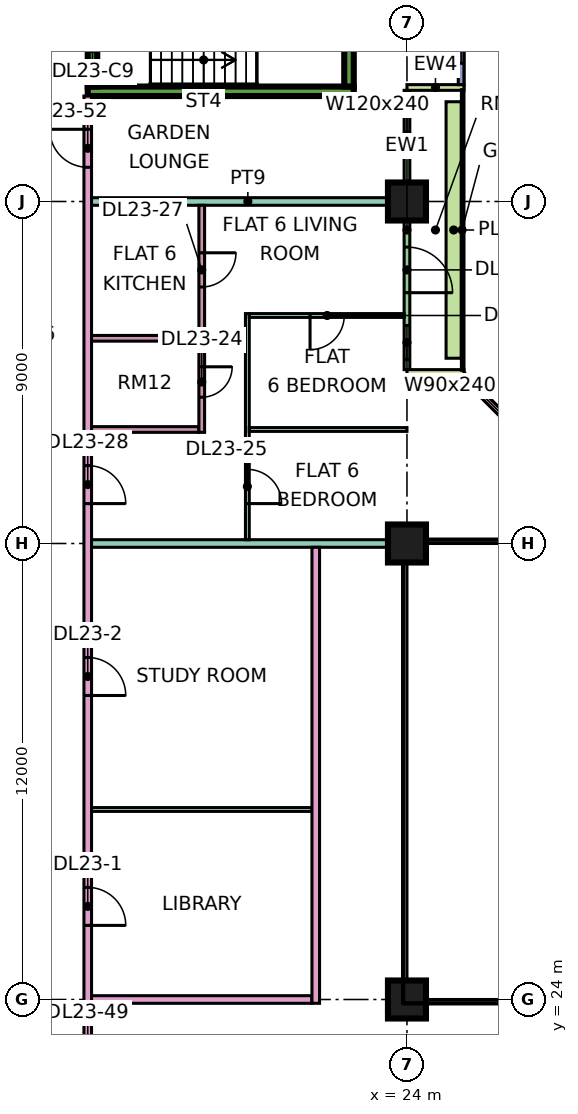
"""IFC4 building model, lengths in metres.
Left out: names, types, materials, properties, quantities, classifications, styles, units other than length and angle.
Written with IfcOpenShell. Run it as: python <this file> out.ifc"""

import sys

from ifc_helpers import new_model, si_unit, direction, frame, frame_2d, origin, origin_2d, place, context, subcontext, project, spatial, rectangle, extrude, element, fill, save


model = new_model("IFC4")
c1 = context("Model", 3, precision=1e-05, world=origin(), true_north=direction((0.0, 1.0)))
c2 = subcontext(c1, "Body", "Model", "MODEL_VIEW")
j1 = project(units=[si_unit("LENGTHUNIT", "METRE"), si_unit("PLANEANGLEUNIT", "RADIAN")], contexts=[c1])
p1 = place(None, origin())
s1 = spatial("IfcSite", under=j1, at=p1, CompositionType="ELEMENT")
p2 = place(p1, origin())
s2 = spatial("IfcBuilding", under=s1, at=p2, CompositionType="ELEMENT")
p3 = place(p2, frame((0.0, 0.0, 103.15)))
s3 = spatial("IfcBuildingStorey", under=s2, at=p3, CompositionType="ELEMENT", Elevation=103.15)
for number, where, z_axis, x_axis in (
    (1, (24.0, 24.0, 0.0), (0.0, 0.0, 1.0), (1.0, 0.0, 0.0)),
    (2, (24.0, 36.0, 0.0), (0.0, 0.0, 1.0), (1.0, 0.0, 0.0)),
    (3, (24.0, 45.0, 0.0), (0.0, 0.0, 1.0), (1.0, 0.0, 0.0)),
):
    element("IfcColumn", number, at=place(p3, frame(where, z_axis=z_axis, x_axis=x_axis)), inside=s3, PredefinedType="COLUMN", context=c2, shape_type="SweptSolid", body=[
        extrude(rectangle(XDim=1.0, YDim=1.0, at=origin_2d()), origin(), (0.0, 0.0, 1.0), 3.75),
    ])
p4 = place(p3, frame((15.6, 47.9, 0.0), z_axis=(0.0, 0.0, 1.0), x_axis=(1.0, 0.0, 0.0)))
e4 = element("IfcWall", 4, at=p4, inside=s3, PredefinedType="SHEAR", context=c2, shape_type="SweptSolid", body=[
    extrude(rectangle(XDim=7.0, YDim=0.25, at=frame_2d((3.5, 0.0))), origin(), (0.0, 0.0, 1.0), 3.75),
])
p5 = place(p3, frame((15.725, 48.025, 0.0), z_axis=(0.0, 0.0, 1.0), x_axis=(0.0, 1.0, 0.0)))
e5 = element("IfcWall", 5, at=p5, inside=s3, PredefinedType="SHEAR", context=c2, shape_type="SweptSolid", body=[
    extrude(rectangle(XDim=2.95, YDim=0.25, at=frame_2d((1.475, 0.0))), origin(), (0.0, 0.0, 1.0), 3.75),
])
p6 = place(p5, frame((0.925, 0.0, 0.0)))
e6 = element("IfcOpeningElement", 6, at=p6, cuts=e5, PredefinedType="OPENING", context=c2, shape_type="SweptSolid", body=[
    extrude(rectangle(XDim=1.1, YDim=2.2, at=frame_2d((0.55, 1.1))), frame((0.0, 0.135, 0.0), z_axis=(0.0, -1.0, 0.0), x_axis=(1.0, 0.0, 0.0)), (0.0, 0.0, 1.0), 0.27),
])
p7 = place(p3, frame((22.475, 48.025, 0.0), z_axis=(0.0, 0.0, 1.0), x_axis=(0.0, 1.0, 0.0)))
e7 = element("IfcWall", 7, at=p7, inside=s3, PredefinedType="SHEAR", context=c2, shape_type="SweptSolid", body=[
    extrude(rectangle(XDim=2.95, YDim=0.25, at=frame_2d((1.475, 0.0))), origin(), (0.0, 0.0, 1.0), 3.75),
])
p8 = place(p3, frame((28.447, 37.447, 0.0), z_axis=(0.0, 0.0, 1.0), x_axis=(-0.707106781187, 0.707106781187, 0.0)))
e8 = element("IfcWall", 8, at=p8, inside=s3, PredefinedType="SOLIDWALL", context=c2, shape_type="SweptSolid", body=[
    extrude(rectangle(XDim=4.243, YDim=0.15, at=frame_2d((2.121, 0.0))), origin(), (0.0, 0.0, 1.0), 3.35),
])
p9 = place(p8, frame((0.621, 0.0, 0.45)))
e9 = element("IfcOpeningElement", 9, at=p9, cuts=e8, PredefinedType="OPENING", context=c2, shape_type="SweptSolid", body=[
    extrude(rectangle(XDim=3.0, YDim=2.4, at=frame_2d((1.5, 1.2))), frame((0.0, 0.085, 0.0), z_axis=(0.0, -1.0, 0.0), x_axis=(1.0, 0.0, 0.0)), (0.0, 0.0, 1.0), 0.17),
])
p10 = place(p3, frame((24.0, 40.575, 0.0), z_axis=(0.0, 0.0, 1.0), x_axis=(0.0, 1.0, 0.0)))
e10 = element("IfcWall", 10, at=p10, inside=s3, PredefinedType="SOLIDWALL", context=c2, shape_type="SweptSolid", body=[
    extrude(rectangle(XDim=7.35, YDim=0.15, at=frame_2d((3.675, 0.0))), origin(), (0.0, 0.0, 1.0), 3.35),
])
p11 = place(p10, frame((0.262, 0.0, 0.45)))
e11 = element("IfcOpeningElement", 11, at=p11, cuts=e10, PredefinedType="OPENING", context=c2, shape_type="SweptSolid", body=[
    extrude(rectangle(XDim=0.9, YDim=2.4, at=frame_2d((0.45, 1.2))), frame((0.0, 0.085, 0.0), z_axis=(0.0, -1.0, 0.0), x_axis=(1.0, 0.0, 0.0)), (0.0, 0.0, 1.0), 0.17),
])
p12 = place(p10, frame((2.025, 0.0, 0.0)))
e12 = element("IfcOpeningElement", 12, at=p12, cuts=e10, PredefinedType="OPENING", context=c2, shape_type="SweptSolid", body=[
    extrude(rectangle(XDim=1.2, YDim=2.4, at=frame_2d((0.6, 1.2))), frame((0.0, 0.085, 0.0), z_axis=(0.0, -1.0, 0.0), x_axis=(1.0, 0.0, 0.0)), (0.0, 0.0, 1.0), 0.17),
])
p13 = place(p10, frame((5.587, 0.0, 0.45)))
e13 = element("IfcOpeningElement", 13, at=p13, cuts=e10, PredefinedType="OPENING", context=c2, shape_type="SweptSolid", body=[
    extrude(rectangle(XDim=1.2, YDim=2.4, at=frame_2d((0.6, 1.2))), frame((0.0, 0.085, 0.0), z_axis=(0.0, -1.0, 0.0), x_axis=(1.0, 0.0, 0.0)), (0.0, 0.0, 1.0), 0.17),
])
for number, where, z_axis, x_axis in (
    (14, (25.5, 40.5, 0.0), (0.0, 0.0, 1.0), (-1.0, 0.0, 0.0)),
    (15, (25.5, 48.0, 0.0), (0.0, 0.0, 1.0), (-1.0, 0.0, 0.0)),
):
    element("IfcWall", number, at=place(p3, frame(where, z_axis=z_axis, x_axis=x_axis)), inside=s3, PredefinedType="SOLIDWALL", context=c2, shape_type="SweptSolid", body=[
        extrude(rectangle(XDim=1.5, YDim=0.15, at=frame_2d((0.75, 0.0))), origin(), (0.0, 0.0, 1.0), 3.35),
    ])
p14 = place(p3, frame((25.425, 48.075, 0.0), z_axis=(0.0, 0.0, 1.0), x_axis=(0.0, 1.0, 0.0)))
e16 = element("IfcWall", 16, at=p14, inside=s3, PredefinedType="SOLIDWALL", context=c2, shape_type="SweptSolid", body=[
    extrude(rectangle(XDim=13.425, YDim=0.15, at=frame_2d((6.712, 0.0))), origin(), (0.0, 0.0, 1.0), 3.35),
])
p15 = place(p14, frame((0.562, 0.0, 0.45)))
e17 = element("IfcOpeningElement", 17, at=p15, cuts=e16, PredefinedType="OPENING", context=c2, shape_type="SweptSolid", body=[
    extrude(rectangle(XDim=4.8, YDim=2.4, at=frame_2d((2.4, 1.2))), frame((0.0, 0.085, 0.0), z_axis=(0.0, -1.0, 0.0), x_axis=(1.0, 0.0, 0.0)), (0.0, 0.0, 1.0), 0.17),
])
p16 = place(p14, frame((6.525, 0.0, 0.45)))
e18 = element("IfcOpeningElement", 18, at=p16, cuts=e16, PredefinedType="OPENING", context=c2, shape_type="SweptSolid", body=[
    extrude(rectangle(XDim=1.8, YDim=2.4, at=frame_2d((0.9, 1.2))), frame((0.0, 0.085, 0.0), z_axis=(0.0, -1.0, 0.0), x_axis=(1.0, 0.0, 0.0)), (0.0, 0.0, 1.0), 0.17),
])
p17 = place(p14, frame((9.525, 0.0, 0.45)))
e19 = element("IfcOpeningElement", 19, at=p17, cuts=e16, PredefinedType="OPENING", context=c2, shape_type="SweptSolid", body=[
    extrude(rectangle(XDim=1.8, YDim=2.4, at=frame_2d((0.9, 1.2))), frame((0.0, 0.085, 0.0), z_axis=(0.0, -1.0, 0.0), x_axis=(1.0, 0.0, 0.0)), (0.0, 0.0, 1.0), 0.17),
])
p18 = place(p14, frame((12.225, 0.0, 0.45)))
e20 = element("IfcOpeningElement", 20, at=p18, cuts=e16, PredefinedType="OPENING", context=c2, shape_type="SweptSolid", body=[
    extrude(rectangle(XDim=0.9, YDim=2.4, at=frame_2d((0.45, 1.2))), frame((0.0, 0.085, 0.0), z_axis=(0.0, -1.0, 0.0), x_axis=(1.0, 0.0, 0.0)), (0.0, 0.0, 1.0), 0.17),
])
p19 = place(p3, frame((25.229, 40.875, 0.0), z_axis=(0.0, 0.0, 1.0), x_axis=(0.0, 1.0, 0.0)))
e21 = element("IfcWall", 21, at=p19, inside=s3, PredefinedType="SOLIDWALL", context=c2, shape_type="SweptSolid", body=[
    extrude(rectangle(XDim=6.75, YDim=0.4, at=frame_2d((3.375, 0.0))), origin(), (0.0, 0.0, 1.0), 0.7),
])
p20 = place(p3, frame((15.6, 20.0, 0.0), z_axis=(0.0, 0.0, 1.0), x_axis=(0.0, 1.0, 0.0)))
e22 = element("IfcWall", 22, at=p20, inside=s3, PredefinedType="PARTITIONING", context=c2, shape_type="SweptSolid", body=[
    extrude(rectangle(XDim=27.775, YDim=0.2, at=frame_2d((13.887, 0.0))), origin(), (0.0, 0.0, 1.0), 3.35),
])
p21 = place(p20, frame((5.95, 0.0, 0.0)))
e23 = element("IfcOpeningElement", 23, at=p21, cuts=e22, PredefinedType="OPENING", context=c2, shape_type="SweptSolid", body=[
    extrude(rectangle(XDim=1.0, YDim=2.1, at=frame_2d((0.5, 1.05))), frame((0.0, 0.11, 0.0), z_axis=(0.0, -1.0, 0.0), x_axis=(1.0, 0.0, 0.0)), (0.0, 0.0, 1.0), 0.22),
])
p22 = place(p20, frame((12.0, 0.0, 0.0)))
e24 = element("IfcOpeningElement", 24, at=p22, cuts=e22, PredefinedType="OPENING", context=c2, shape_type="SweptSolid", body=[
    extrude(rectangle(XDim=1.0, YDim=2.1, at=frame_2d((0.5, 1.05))), frame((0.0, 0.11, 0.0), z_axis=(0.0, -1.0, 0.0), x_axis=(1.0, 0.0, 0.0)), (0.0, 0.0, 1.0), 0.22),
])
p23 = place(p20, frame((17.05, 0.0, 0.0)))
e25 = element("IfcOpeningElement", 25, at=p23, cuts=e22, PredefinedType="OPENING", context=c2, shape_type="SweptSolid", body=[
    extrude(rectangle(XDim=1.0, YDim=2.1, at=frame_2d((0.5, 1.05))), frame((0.0, 0.11, 0.0), z_axis=(0.0, -1.0, 0.0), x_axis=(1.0, 0.0, 0.0)), (0.0, 0.0, 1.0), 0.22),
])
p24 = place(p20, frame((1.15, 0.0, 0.0)))
e26 = element("IfcOpeningElement", 26, at=p24, cuts=e22, PredefinedType="OPENING", context=c2, shape_type="SweptSolid", body=[
    extrude(rectangle(XDim=1.8, YDim=2.1, at=frame_2d((0.9, 1.05))), frame((0.0, 0.11, 0.0), z_axis=(0.0, -1.0, 0.0), x_axis=(1.0, 0.0, 0.0)), (0.0, 0.0, 1.0), 0.22),
])
p25 = place(p20, frame((25.9, 0.0, 0.0)))
e27 = element("IfcOpeningElement", 27, at=p25, cuts=e22, PredefinedType="OPENING", context=c2, shape_type="SweptSolid", body=[
    extrude(rectangle(XDim=1.0, YDim=2.1, at=frame_2d((0.5, 1.05))), frame((0.0, 0.11, 0.0), z_axis=(0.0, -1.0, 0.0), x_axis=(1.0, 0.0, 0.0)), (0.0, 0.0, 1.0), 0.22),
])
p26 = place(p3, frame((15.7, 24.0, 0.0), z_axis=(0.0, 0.0, 1.0), x_axis=(1.0, 0.0, 0.0)))
e28 = element("IfcWall", 28, at=p26, inside=s3, PredefinedType="PARTITIONING", context=c2, shape_type="SweptSolid", body=[
    extrude(rectangle(XDim=5.8, YDim=0.2, at=frame_2d((2.9, 0.0))), origin(), (0.0, 0.0, 1.0), 3.35),
])
p27 = place(p3, frame((15.7, 29.0, 0.0), z_axis=(0.0, 0.0, 1.0), x_axis=(1.0, 0.0, 0.0)))
e29 = element("IfcWall", 29, at=p27, inside=s3, PredefinedType="PARTITIONING", context=c2, shape_type="SweptSolid", body=[
    extrude(rectangle(XDim=5.8, YDim=0.1, at=frame_2d((2.9, 0.0))), origin(), (0.0, 0.0, 1.0), 3.35),
])
p28 = place(p3, frame((15.7, 36.0, 0.0), z_axis=(0.0, 0.0, 1.0), x_axis=(1.0, 0.0, 0.0)))
e30 = element("IfcWall", 30, at=p28, inside=s3, PredefinedType="PARTITIONING", context=c2, shape_type="SweptSolid", body=[
    extrude(rectangle(XDim=8.3, YDim=0.2, at=frame_2d((4.15, 0.0))), origin(), (0.0, 0.0, 1.0), 3.35),
])
for number, where, z_axis, x_axis in (
    (31, (15.7, 39.0, 0.0), (0.0, 0.0, 1.0), (1.0, 0.0, 0.0)),
    (32, (15.7, 41.4, 0.0), (0.0, 0.0, 1.0), (1.0, 0.0, 0.0)),
):
    element("IfcWall", number, at=place(p3, frame(where, z_axis=z_axis, x_axis=x_axis)), inside=s3, PredefinedType="PARTITIONING", context=c2, shape_type="SweptSolid", body=[
        extrude(rectangle(XDim=2.825, YDim=0.15, at=frame_2d((1.413, 0.0))), origin(), (0.0, 0.0, 1.0), 3.35),
    ])
p29 = place(p3, frame((15.7, 45.0, 0.0), z_axis=(0.0, 0.0, 1.0), x_axis=(1.0, 0.0, 0.0)))
e33 = element("IfcWall", 33, at=p29, inside=s3, PredefinedType="PARTITIONING", context=c2, shape_type="SweptSolid", body=[
    extrude(rectangle(XDim=8.226, YDim=0.2, at=frame_2d((4.113, 0.0))), origin(), (0.0, 0.0, 1.0), 3.35),
])
p30 = place(p3, frame((18.6, 38.925, 0.0), z_axis=(0.0, 0.0, 1.0), x_axis=(0.0, 1.0, 0.0)))
e34 = element("IfcWall", 34, at=p30, inside=s3, PredefinedType="PARTITIONING", context=c2, shape_type="SweptSolid", body=[
    extrude(rectangle(XDim=5.975, YDim=0.15, at=frame_2d((2.987, 0.0))), origin(), (0.0, 0.0, 1.0), 3.35),
])
p31 = place(p30, frame((0.925, 0.0, 0.0)))
e35 = element("IfcOpeningElement", 35, at=p31, cuts=e34, PredefinedType="OPENING", context=c2, shape_type="SweptSolid", body=[
    extrude(rectangle(XDim=0.8, YDim=2.1, at=frame_2d((0.4, 1.05))), frame((0.0, 0.085, 0.0), z_axis=(0.0, -1.0, 0.0), x_axis=(1.0, 0.0, 0.0)), (0.0, 0.0, 1.0), 0.17),
])
p32 = place(p30, frame((3.825, 0.0, 0.0)))
e36 = element("IfcOpeningElement", 36, at=p32, cuts=e34, PredefinedType="OPENING", context=c2, shape_type="SweptSolid", body=[
    extrude(rectangle(XDim=0.9, YDim=2.1, at=frame_2d((0.45, 1.05))), frame((0.0, 0.085, 0.0), z_axis=(0.0, -1.0, 0.0), x_axis=(1.0, 0.0, 0.0)), (0.0, 0.0, 1.0), 0.17),
])
p33 = place(p3, frame((19.8, 36.1, 0.0), z_axis=(0.0, 0.0, 1.0), x_axis=(0.0, 1.0, 0.0)))
e37 = element("IfcWall", 37, at=p33, inside=s3, PredefinedType="PARTITIONING", context=c2, shape_type="SweptSolid", body=[
    extrude(rectangle(XDim=5.95, YDim=0.1, at=frame_2d((2.975, 0.0))), origin(), (0.0, 0.0, 1.0), 3.35),
])
p34 = place(p33, frame((0.95, 0.0, 0.0)))
e38 = element("IfcOpeningElement", 38, at=p34, cuts=e37, PredefinedType="OPENING", context=c2, shape_type="SweptSolid", body=[
    extrude(rectangle(XDim=0.9, YDim=2.1, at=frame_2d((0.45, 1.05))), frame((0.0, 0.06, 0.0), z_axis=(0.0, -1.0, 0.0), x_axis=(1.0, 0.0, 0.0)), (0.0, 0.0, 1.0), 0.12),
])
p35 = place(p3, frame((19.85, 39.0, 0.0), z_axis=(0.0, 0.0, 1.0), x_axis=(1.0, 0.0, 0.0)))
e39 = element("IfcWall", 39, at=p35, inside=s3, PredefinedType="PARTITIONING", context=c2, shape_type="SweptSolid", body=[
    extrude(rectangle(XDim=4.15, YDim=0.1, at=frame_2d((2.075, 0.0))), origin(), (0.0, 0.0, 1.0), 3.35),
])
p36 = place(p3, frame((19.85, 42.0, 0.0), z_axis=(0.0, 0.0, 1.0), x_axis=(1.0, 0.0, 0.0)))
e40 = element("IfcWall", 40, at=p36, inside=s3, PredefinedType="PARTITIONING", context=c2, shape_type="SweptSolid", body=[
    extrude(rectangle(XDim=4.076, YDim=0.1, at=frame_2d((2.038, 0.0))), origin(), (0.0, 0.0, 1.0), 3.35),
])
p37 = place(p36, frame((1.6, 0.0, 0.0)))
e41 = element("IfcOpeningElement", 41, at=p37, cuts=e40, PredefinedType="OPENING", context=c2, shape_type="SweptSolid", body=[
    extrude(rectangle(XDim=0.9, YDim=2.1, at=frame_2d((0.45, 1.05))), frame((0.0, 0.06, 0.0), z_axis=(0.0, -1.0, 0.0), x_axis=(1.0, 0.0, 0.0)), (0.0, 0.0, 1.0), 0.12),
])
p38 = place(p3, frame((21.6, 23.9, 0.0), z_axis=(0.0, 0.0, 1.0), x_axis=(0.0, 1.0, 0.0)))
e42 = element("IfcWall", 42, at=p38, inside=s3, PredefinedType="PARTITIONING", context=c2, shape_type="SweptSolid", body=[
    extrude(rectangle(XDim=12.0, YDim=0.2, at=frame_2d((6.0, 0.0))), origin(), (0.0, 0.0, 1.0), 3.35),
])
p39 = place(p9, origin())
e43 = element("IfcWindow", 43, at=p39, inside=s3, PartitioningType="SINGLE_PANEL", PredefinedType="WINDOW", context=c2, shape_type="SweptSolid", body=[
    extrude(rectangle(XDim=3.0, YDim=2.4, at=frame_2d((1.5, 1.2))), frame((0.0, 0.03, 0.0), z_axis=(0.0, -1.0, 0.0), x_axis=(1.0, 0.0, 0.0)), (0.0, 0.0, 1.0), 0.06),
])
fill(e9, e43)
p40 = place(p11, origin())
e44 = element("IfcWindow", 44, at=p40, inside=s3, PartitioningType="SINGLE_PANEL", PredefinedType="WINDOW", context=c2, shape_type="SweptSolid", body=[
    extrude(rectangle(XDim=0.9, YDim=2.4, at=frame_2d((0.45, 1.2))), frame((0.0, 0.03, 0.0), z_axis=(0.0, -1.0, 0.0), x_axis=(1.0, 0.0, 0.0)), (0.0, 0.0, 1.0), 0.06),
])
fill(e11, e44)
p41 = place(p12, frame((1.2, 0.0, 0.0), z_axis=(0.0, 0.0, 1.0), x_axis=(-1.0, 0.0, 0.0)))
e45 = element("IfcDoor", 45, at=p41, inside=s3, OperationType="DOUBLE_DOOR_SINGLE_SWING", PredefinedType="DOOR", context=c2, shape_type="SweptSolid", body=[
    extrude(rectangle(XDim=1.2, YDim=2.4, at=frame_2d((0.6, 1.2))), frame((0.0, 0.025, 0.0), z_axis=(0.0, -1.0, 0.0), x_axis=(1.0, 0.0, 0.0)), (0.0, 0.0, 1.0), 0.05),
])
fill(e12, e45)
p42 = place(p13, origin())
e46 = element("IfcWindow", 46, at=p42, inside=s3, PartitioningType="SINGLE_PANEL", PredefinedType="WINDOW", context=c2, shape_type="SweptSolid", body=[
    extrude(rectangle(XDim=1.2, YDim=2.4, at=frame_2d((0.6, 1.2))), frame((0.0, 0.03, 0.0), z_axis=(0.0, -1.0, 0.0), x_axis=(1.0, 0.0, 0.0)), (0.0, 0.0, 1.0), 0.06),
])
fill(e13, e46)
p43 = place(p15, origin())
e47 = element("IfcWindow", 47, at=p43, inside=s3, PartitioningType="SINGLE_PANEL", PredefinedType="WINDOW", context=c2, shape_type="SweptSolid", body=[
    extrude(rectangle(XDim=4.8, YDim=2.4, at=frame_2d((2.4, 1.2))), frame((0.0, 0.03, 0.0), z_axis=(0.0, -1.0, 0.0), x_axis=(1.0, 0.0, 0.0)), (0.0, 0.0, 1.0), 0.06),
])
fill(e17, e47)
p44 = place(p21, frame((1.0, 0.0, 0.0), z_axis=(0.0, 0.0, 1.0), x_axis=(-1.0, 0.0, 0.0)))
e48 = element("IfcDoor", 48, at=p44, inside=s3, OperationType="SINGLE_SWING_LEFT", PredefinedType="DOOR", context=c2, shape_type="SweptSolid", body=[
    extrude(rectangle(XDim=1.0, YDim=2.1, at=frame_2d((0.5, 1.05))), frame((0.0, 0.025, 0.0), z_axis=(0.0, -1.0, 0.0), x_axis=(1.0, 0.0, 0.0)), (0.0, 0.0, 1.0), 0.05),
])
fill(e23, e48)
p45 = place(p22, frame((1.0, 0.0, 0.0), z_axis=(0.0, 0.0, 1.0), x_axis=(-1.0, 0.0, 0.0)))
e49 = element("IfcDoor", 49, at=p45, inside=s3, OperationType="SINGLE_SWING_LEFT", PredefinedType="DOOR", context=c2, shape_type="SweptSolid", body=[
    extrude(rectangle(XDim=1.0, YDim=2.1, at=frame_2d((0.5, 1.05))), frame((0.0, 0.025, 0.0), z_axis=(0.0, -1.0, 0.0), x_axis=(1.0, 0.0, 0.0)), (0.0, 0.0, 1.0), 0.05),
])
fill(e24, e49)
p46 = place(p31, origin())
e50 = element("IfcDoor", 50, at=p46, inside=s3, OperationType="SINGLE_SWING_RIGHT", PredefinedType="DOOR", context=c2, shape_type="SweptSolid", body=[
    extrude(rectangle(XDim=0.8, YDim=2.1, at=frame_2d((0.4, 1.05))), frame((0.0, 0.025, 0.0), z_axis=(0.0, -1.0, 0.0), x_axis=(1.0, 0.0, 0.0)), (0.0, 0.0, 1.0), 0.05),
])
fill(e35, e50)
p47 = place(p34, frame((0.9, 0.0, 0.0), z_axis=(0.0, 0.0, 1.0), x_axis=(-1.0, 0.0, 0.0)))
e51 = element("IfcDoor", 51, at=p47, inside=s3, OperationType="SINGLE_SWING_LEFT", PredefinedType="DOOR", context=c2, shape_type="SweptSolid", body=[
    extrude(rectangle(XDim=0.9, YDim=2.1, at=frame_2d((0.45, 1.05))), frame((0.0, 0.025, 0.0), z_axis=(0.0, -1.0, 0.0), x_axis=(1.0, 0.0, 0.0)), (0.0, 0.0, 1.0), 0.05),
])
fill(e38, e51)
p48 = place(p37, frame((0.9, 0.0, 0.0), z_axis=(0.0, 0.0, 1.0), x_axis=(-1.0, 0.0, 0.0)))
e52 = element("IfcDoor", 52, at=p48, inside=s3, OperationType="SINGLE_SWING_LEFT", PredefinedType="DOOR", context=c2, shape_type="SweptSolid", body=[
    extrude(rectangle(XDim=0.9, YDim=2.1, at=frame_2d((0.45, 1.05))), frame((0.0, 0.025, 0.0), z_axis=(0.0, -1.0, 0.0), x_axis=(1.0, 0.0, 0.0)), (0.0, 0.0, 1.0), 0.05),
])
fill(e41, e52)
p49 = place(p32, origin())
e53 = element("IfcDoor", 53, at=p49, inside=s3, OperationType="SINGLE_SWING_RIGHT", PredefinedType="DOOR", context=c2, shape_type="SweptSolid", body=[
    extrude(rectangle(XDim=0.9, YDim=2.1, at=frame_2d((0.45, 1.05))), frame((0.0, 0.025, 0.0), z_axis=(0.0, -1.0, 0.0), x_axis=(1.0, 0.0, 0.0)), (0.0, 0.0, 1.0), 0.05),
])
fill(e36, e53)
p50 = place(p23, frame((1.0, 0.0, 0.0), z_axis=(0.0, 0.0, 1.0), x_axis=(-1.0, 0.0, 0.0)))
e54 = element("IfcDoor", 54, at=p50, inside=s3, OperationType="SINGLE_SWING_LEFT", PredefinedType="DOOR", context=c2, shape_type="SweptSolid", body=[
    extrude(rectangle(XDim=1.0, YDim=2.1, at=frame_2d((0.5, 1.05))), frame((0.0, 0.025, 0.0), z_axis=(0.0, -1.0, 0.0), x_axis=(1.0, 0.0, 0.0)), (0.0, 0.0, 1.0), 0.05),
])
fill(e25, e54)
p51 = place(p25, frame((1.0, 0.0, 0.0), z_axis=(0.0, 0.0, 1.0), x_axis=(-1.0, 0.0, 0.0)))
e55 = element("IfcDoor", 55, at=p51, inside=s3, OperationType="SINGLE_SWING_RIGHT", PredefinedType="DOOR", context=c2, shape_type="SweptSolid", body=[
    extrude(rectangle(XDim=1.0, YDim=2.1, at=frame_2d((0.5, 1.05))), frame((0.0, 0.025, 0.0), z_axis=(0.0, -1.0, 0.0), x_axis=(1.0, 0.0, 0.0)), (0.0, 0.0, 1.0), 0.05),
])
fill(e27, e55)
save(model, sys.argv[1])
